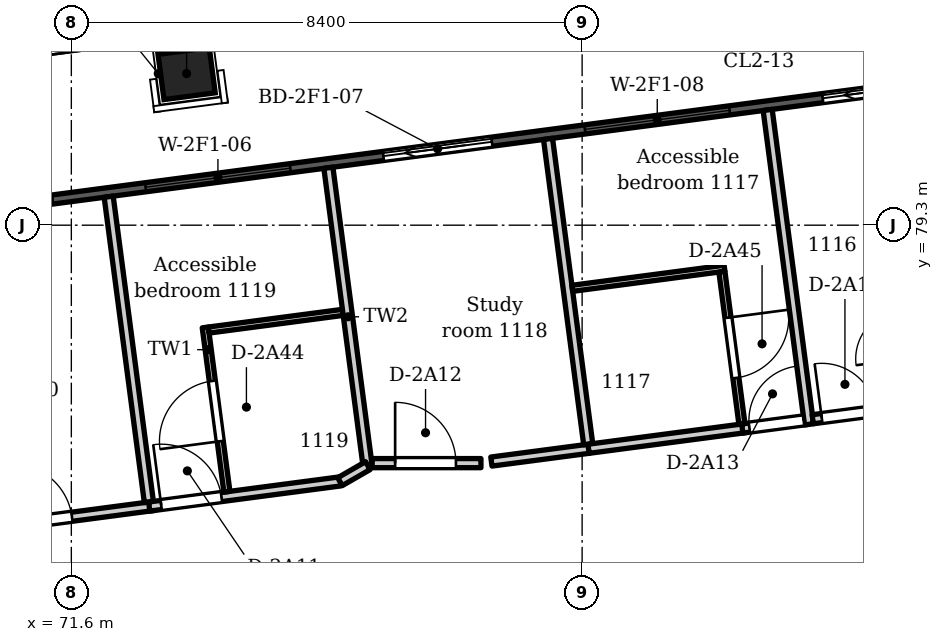
"""IFC4 building model, lengths in metres.
Left out: names, types, materials, properties, quantities, classifications, styles, units other than length and angle.
Written with IfcOpenShell. Run it as: python <this file> out.ifc"""

import sys

from ifc_helpers import new_model, si_unit, direction, frame, frame_2d, origin, origin_2d, place, context, subcontext, project, spatial, polyline, rectangle, outline, extrude, element, fill, save


model = new_model("IFC4")
c1 = context("Model", 3, precision=1e-05, world=origin(), true_north=direction((0.0, 1.0)))
c2 = subcontext(c1, "Body", "Model", "MODEL_VIEW")
j1 = project(units=[si_unit("LENGTHUNIT", "METRE"), si_unit("PLANEANGLEUNIT", "RADIAN")], contexts=[c1])
p1 = place(None, origin())
s1 = spatial("IfcSite", under=j1, at=p1, CompositionType="ELEMENT")
p2 = place(p1, origin())
s2 = spatial("IfcBuilding", under=s1, at=p2, CompositionType="ELEMENT")
p3 = place(p2, frame((0.0, 0.0, 50.4)))
s3 = spatial("IfcBuildingStorey", under=s2, at=p3, CompositionType="ELEMENT", Elevation=50.4)
p4 = place(p3, frame((73.496, 81.793, -0.35), z_axis=(0.0, 0.0, 1.0), x_axis=(0.991444861374, 0.13052619222, 0.0)))
e1 = element("IfcColumn", 1, at=p4, inside=s3, PredefinedType="COLUMN", context=c2, shape_type="SweptSolid", body=[
    extrude(rectangle(XDim=0.85, YDim=0.75, at=origin_2d()), origin(), (0.0, 0.0, 1.0), 3.95),
])
p5 = place(p3, frame((54.142, 77.465, 0.0), z_axis=(0.0, 0.0, 1.0), x_axis=(0.991444696532, 0.130527444308, 0.0)))
e2 = element("IfcWall", 2, at=p5, inside=s3, PredefinedType="SOLIDWALL", context=c2, shape_type="SweptSolid", body=[
    extrude(outline(polyline([(0.149, 0.075), (0.149, -0.075), (47.217, -0.075), (47.217, 0.075), (0.149, 0.075)])), origin(), (0.0, 0.0, 1.0), 3.3),
])
p6 = place(p5, frame((1.222, 0.0, 0.0)))
e3 = element("IfcOpeningElement", 3, at=p6, cuts=e2, PredefinedType="OPENING", context=c2, shape_type="SweptSolid", body=[
    extrude(rectangle(XDim=1.8, YDim=2.6, at=frame_2d((0.9, 1.3))), frame((0.0, 0.085, 0.0), z_axis=(0.0, -1.0, 0.0), x_axis=(1.0, 0.0, 0.0)), (0.0, 0.0, 1.0), 0.17),
])
p7 = place(p5, frame((4.565, 0.0, 0.0)))
e4 = element("IfcOpeningElement", 4, at=p7, cuts=e2, PredefinedType="OPENING", context=c2, shape_type="SweptSolid", body=[
    extrude(rectangle(XDim=1.8, YDim=2.6, at=frame_2d((0.9, 1.3))), frame((0.0, 0.085, 0.0), z_axis=(0.0, -1.0, 0.0), x_axis=(1.0, 0.0, 0.0)), (0.0, 0.0, 1.0), 0.17),
])
p8 = place(p5, frame((8.209, 0.0, 0.0)))
e5 = element("IfcOpeningElement", 5, at=p8, cuts=e2, PredefinedType="OPENING", context=c2, shape_type="SweptSolid", body=[
    extrude(rectangle(XDim=1.8, YDim=2.6, at=frame_2d((0.9, 1.3))), frame((0.0, 0.085, 0.0), z_axis=(0.0, -1.0, 0.0), x_axis=(1.0, 0.0, 0.0)), (0.0, 0.0, 1.0), 0.17),
])
p9 = place(p5, frame((12.453, 0.0, 0.0)))
e6 = element("IfcOpeningElement", 6, at=p9, cuts=e2, PredefinedType="OPENING", context=c2, shape_type="SweptSolid", body=[
    extrude(rectangle(XDim=1.8, YDim=2.6, at=frame_2d((0.9, 1.3))), frame((0.0, 0.085, 0.0), z_axis=(0.0, -1.0, 0.0), x_axis=(1.0, 0.0, 0.0)), (0.0, 0.0, 1.0), 0.17),
])
p10 = place(p5, frame((15.496, 0.0, 0.0)))
e7 = element("IfcOpeningElement", 7, at=p10, cuts=e2, PredefinedType="OPENING", context=c2, shape_type="SweptSolid", body=[
    extrude(rectangle(XDim=1.8, YDim=2.6, at=frame_2d((0.9, 1.3))), frame((0.0, 0.085, 0.0), z_axis=(0.0, -1.0, 0.0), x_axis=(1.0, 0.0, 0.0)), (0.0, 0.0, 1.0), 0.17),
])
p11 = place(p5, frame((18.84, 0.0, 0.15)))
e8 = element("IfcOpeningElement", 8, at=p11, cuts=e2, PredefinedType="OPENING", context=c2, shape_type="SweptSolid", body=[
    extrude(rectangle(XDim=2.4, YDim=2.45, at=frame_2d((1.2, 1.225))), frame((0.0, 0.085, 0.0), z_axis=(0.0, -1.0, 0.0), x_axis=(1.0, 0.0, 0.0)), (0.0, 0.0, 1.0), 0.17),
])
p12 = place(p5, frame((22.783, 0.0, 0.0)))
e9 = element("IfcOpeningElement", 9, at=p12, cuts=e2, PredefinedType="OPENING", context=c2, shape_type="SweptSolid", body=[
    extrude(rectangle(XDim=1.8, YDim=2.6, at=frame_2d((0.9, 1.3))), frame((0.0, 0.085, 0.0), z_axis=(0.0, -1.0, 0.0), x_axis=(1.0, 0.0, 0.0)), (0.0, 0.0, 1.0), 0.17),
])
p13 = place(p5, frame((26.127, 0.0, 0.15)))
e10 = element("IfcOpeningElement", 10, at=p13, cuts=e2, PredefinedType="OPENING", context=c2, shape_type="SweptSolid", body=[
    extrude(rectangle(XDim=2.4, YDim=2.45, at=frame_2d((1.2, 1.225))), frame((0.0, 0.085, 0.0), z_axis=(0.0, -1.0, 0.0), x_axis=(1.0, 0.0, 0.0)), (0.0, 0.0, 1.0), 0.17),
])
p14 = place(p5, frame((30.071, 0.0, 0.0)))
e11 = element("IfcOpeningElement", 11, at=p14, cuts=e2, PredefinedType="OPENING", context=c2, shape_type="SweptSolid", body=[
    extrude(rectangle(XDim=1.8, YDim=2.6, at=frame_2d((0.9, 1.3))), frame((0.0, 0.085, 0.0), z_axis=(0.0, -1.0, 0.0), x_axis=(1.0, 0.0, 0.0)), (0.0, 0.0, 1.0), 0.17),
])
p15 = place(p5, frame((33.114, 0.0, 0.0)))
e12 = element("IfcOpeningElement", 12, at=p15, cuts=e2, PredefinedType="OPENING", context=c2, shape_type="SweptSolid", body=[
    extrude(rectangle(XDim=1.8, YDim=2.6, at=frame_2d((0.9, 1.3))), frame((0.0, 0.085, 0.0), z_axis=(0.0, -1.0, 0.0), x_axis=(1.0, 0.0, 0.0)), (0.0, 0.0, 1.0), 0.17),
])
p16 = place(p5, frame((37.358, 0.0, 0.0)))
e13 = element("IfcOpeningElement", 13, at=p16, cuts=e2, PredefinedType="OPENING", context=c2, shape_type="SweptSolid", body=[
    extrude(rectangle(XDim=1.8, YDim=2.6, at=frame_2d((0.9, 1.3))), frame((0.0, 0.085, 0.0), z_axis=(0.0, -1.0, 0.0), x_axis=(1.0, 0.0, 0.0)), (0.0, 0.0, 1.0), 0.17),
])
p17 = place(p5, frame((41.001, 0.0, 0.0)))
e14 = element("IfcOpeningElement", 14, at=p17, cuts=e2, PredefinedType="OPENING", context=c2, shape_type="SweptSolid", body=[
    extrude(rectangle(XDim=1.8, YDim=2.6, at=frame_2d((0.9, 1.3))), frame((0.0, 0.085, 0.0), z_axis=(0.0, -1.0, 0.0), x_axis=(1.0, 0.0, 0.0)), (0.0, 0.0, 1.0), 0.17),
])
p18 = place(p5, frame((44.345, 0.0, 0.0)))
e15 = element("IfcOpeningElement", 15, at=p18, cuts=e2, PredefinedType="OPENING", context=c2, shape_type="SweptSolid", body=[
    extrude(rectangle(XDim=1.8, YDim=2.6, at=frame_2d((0.9, 1.3))), frame((0.0, 0.085, 0.0), z_axis=(0.0, -1.0, 0.0), x_axis=(1.0, 0.0, 0.0)), (0.0, 0.0, 1.0), 0.17),
])
p19 = place(p3, frame((69.344, 74.207, 0.0), z_axis=(0.0, 0.0, 1.0), x_axis=(0.991427646688, 0.130656884173, 0.0)))
e16 = element("IfcWall", 16, at=p19, inside=s3, PredefinedType="PARTITIONING", context=c2, shape_type="SweptSolid", body=[
    extrude(rectangle(XDim=3.651, YDim=0.15, at=frame_2d((1.826, 0.0))), origin(), (0.0, 0.0, 1.0), 3.3),
])
p20 = place(p19, frame((1.286, 0.0, 0.0)))
e17 = element("IfcOpeningElement", 17, at=p20, cuts=e16, PredefinedType="OPENING", context=c2, shape_type="SweptSolid", body=[
    extrude(rectangle(XDim=1.0, YDim=2.1, at=frame_2d((0.5, 1.05))), frame((0.0, 0.085, 0.0), z_axis=(0.0, -1.0, 0.0), x_axis=(1.0, 0.0, 0.0)), (0.0, 0.0, 1.0), 0.17),
])
p21 = place(p3, frame((72.214, 79.768, 0.0), z_axis=(0.0, 0.0, 1.0), x_axis=(0.130546792746, -0.991442149045, 0.0)))
e18 = element("IfcWall", 18, at=p21, inside=s3, PredefinedType="PARTITIONING", context=c2, shape_type="SweptSolid", body=[
    extrude(rectangle(XDim=5.064, YDim=0.15, at=frame_2d((2.532, 0.0))), origin(), (0.0, 0.0, 1.0), 3.3),
])
p22 = place(p3, frame((72.881, 74.673, 0.0), z_axis=(0.0, 0.0, 1.0), x_axis=(0.991447742753, 0.130504304105, 0.0)))
e19 = element("IfcWall", 19, at=p22, inside=s3, PredefinedType="PARTITIONING", context=c2, shape_type="SweptSolid", body=[
    extrude(rectangle(XDim=3.171, YDim=0.15, at=frame_2d((1.585, 0.0))), origin(), (0.0, 0.0, 1.0), 3.3),
])
p23 = place(p22, frame((0.198, 0.0, 0.0)))
e20 = element("IfcOpeningElement", 20, at=p23, cuts=e19, PredefinedType="OPENING", context=c2, shape_type="SweptSolid", body=[
    extrude(rectangle(XDim=1.0, YDim=2.1, at=frame_2d((0.5, 1.05))), frame((0.0, 0.085, 0.0), z_axis=(0.0, -1.0, 0.0), x_axis=(1.0, 0.0, 0.0)), (0.0, 0.0, 1.0), 0.17),
])
p24 = place(p3, frame((73.802, 77.619, 0.0), z_axis=(0.0, 0.0, 1.0), x_axis=(0.130514759302, -0.991446366479, 0.0)))
e21 = element("IfcWall", 21, at=p24, inside=s3, PredefinedType="PARTITIONING", context=c2, shape_type="SweptSolid", body=[
    extrude(rectangle(XDim=2.725, YDim=0.1, at=frame_2d((1.363, 0.0))), origin(), (0.0, 0.0, 1.0), 3.3),
])
p25 = place(p24, frame((0.888, 0.0, 0.0)))
e22 = element("IfcOpeningElement", 22, at=p25, cuts=e21, PredefinedType="OPENING", context=c2, shape_type="SweptSolid", body=[
    extrude(rectangle(XDim=1.0, YDim=2.1, at=frame_2d((0.5, 1.05))), frame((0.0, 0.06, 0.0), z_axis=(0.0, -1.0, 0.0), x_axis=(1.0, 0.0, 0.0)), (0.0, 0.0, 1.0), 0.12),
])
p26 = place(p3, frame((73.859, 77.575, 0.0), z_axis=(0.0, 0.0, 1.0), x_axis=(0.991425141763, 0.130675890199, 0.0)))
e23 = element("IfcWall", 23, at=p26, inside=s3, PredefinedType="PARTITIONING", context=c2, shape_type="SweptSolid", body=[
    extrude(rectangle(XDim=2.225, YDim=0.1, at=frame_2d((1.113, 0.0))), origin(), (0.0, 0.0, 1.0), 3.3),
])
p27 = place(p3, frame((75.827, 80.244, 0.0), z_axis=(0.0, 0.0, 1.0), x_axis=(0.130426407647, -0.991457993154, 0.0)))
e24 = element("IfcWall", 24, at=p27, inside=s3, PredefinedType="PARTITIONING", context=c2, shape_type="SweptSolid", body=[
    extrude(rectangle(XDim=4.944, YDim=0.15, at=frame_2d((2.472, 0.0))), origin(), (0.0, 0.0, 1.0), 3.3),
])
p28 = place(p3, frame((76.018, 75.082, 0.0), z_axis=(0.0, 0.0, 1.0), x_axis=(0.866446896963, 0.499269240734, 0.0)))
e25 = element("IfcWall", 25, at=p28, inside=s3, PredefinedType="PARTITIONING", context=c2, shape_type="SweptSolid", body=[
    extrude(rectangle(XDim=0.529, YDim=0.15, at=frame_2d((0.264, 0.0))), origin(), (0.0, 0.0, 1.0), 3.3),
])
p29 = place(p3, frame((76.547, 75.387, 0.0), z_axis=(0.0, 0.0, 1.0), x_axis=(1.0, 0.0, 0.0)))
e26 = element("IfcWall", 26, at=p29, inside=s3, PredefinedType="PARTITIONING", context=c2, shape_type="SweptSolid", body=[
    extrude(rectangle(XDim=1.789, YDim=0.15, at=frame_2d((0.895, 0.0))), origin(), (0.0, 0.0, 1.0), 3.3),
])
p30 = place(p29, frame((0.378, 0.0, 0.0)))
e27 = element("IfcOpeningElement", 27, at=p30, cuts=e26, PredefinedType="OPENING", context=c2, shape_type="SweptSolid", body=[
    extrude(rectangle(XDim=1.0, YDim=2.1, at=frame_2d((0.5, 1.05))), frame((0.0, 0.085, 0.0), z_axis=(0.0, -1.0, 0.0), x_axis=(1.0, 0.0, 0.0)), (0.0, 0.0, 1.0), 0.17),
])
p31 = place(p3, frame((78.508, 75.413, 0.0), z_axis=(0.0, 0.0, 1.0), x_axis=(0.991484025307, 0.13022836696, 0.0)))
e28 = element("IfcWall", 28, at=p31, inside=s3, PredefinedType="PARTITIONING", context=c2, shape_type="SweptSolid", body=[
    extrude(rectangle(XDim=1.62, YDim=0.15, at=frame_2d((0.81, 0.0))), origin(), (0.0, 0.0, 1.0), 3.3),
])
p32 = place(p3, frame((79.439, 80.719, 0.0), z_axis=(0.0, 0.0, 1.0), x_axis=(0.130505643681, -0.991447566424, 0.0)))
e29 = element("IfcWall", 29, at=p32, inside=s3, PredefinedType="PARTITIONING", context=c2, shape_type="SweptSolid", body=[
    extrude(rectangle(XDim=5.064, YDim=0.15, at=frame_2d((2.532, 0.0))), origin(), (0.0, 0.0, 1.0), 3.3),
])
p33 = place(p3, frame((79.838, 78.262, 0.0), z_axis=(0.0, 0.0, 1.0), x_axis=(0.991430252683, 0.130637108298, 0.0)))
e30 = element("IfcWall", 30, at=p33, inside=s3, PredefinedType="PARTITIONING", context=c2, shape_type="SweptSolid", body=[
    extrude(rectangle(XDim=2.525, YDim=0.1, at=frame_2d((1.262, 0.0))), origin(), (0.0, 0.0, 1.0), 3.3),
])
p34 = place(p3, frame((80.106, 75.623, 0.0), z_axis=(0.0, 0.0, 1.0), x_axis=(0.991448878041, 0.130495678972, 0.0)))
e31 = element("IfcWall", 31, at=p34, inside=s3, PredefinedType="PARTITIONING", context=c2, shape_type="SweptSolid", body=[
    extrude(rectangle(XDim=2.608, YDim=0.15, at=frame_2d((1.304, 0.0))), origin(), (0.0, 0.0, 1.0), 3.3),
])
p35 = place(p3, frame((82.299, 78.535, 0.0), z_axis=(0.0, 0.0, 1.0), x_axis=(0.130504525485, -0.991447713613, 0.0)))
e32 = element("IfcWall", 32, at=p35, inside=s3, PredefinedType="PARTITIONING", context=c2, shape_type="SweptSolid", body=[
    extrude(rectangle(XDim=2.525, YDim=0.1, at=frame_2d((1.263, 0.0))), origin(), (0.0, 0.0, 1.0), 3.3),
])
p36 = place(p35, frame((0.763, 0.0, 0.0)))
e33 = element("IfcOpeningElement", 33, at=p36, cuts=e32, PredefinedType="OPENING", context=c2, shape_type="SweptSolid", body=[
    extrude(rectangle(XDim=1.0, YDim=2.1, at=frame_2d((0.5, 1.05))), frame((0.0, 0.06, 0.0), z_axis=(0.0, -1.0, 0.0), x_axis=(1.0, 0.0, 0.0)), (0.0, 0.0, 1.0), 0.12),
])
p37 = place(p3, frame((82.634, 75.956, 0.0), z_axis=(0.0, 0.0, 1.0), x_axis=(0.99141275319, 0.130769846721, 0.0)))
e34 = element("IfcWall", 34, at=p37, inside=s3, PredefinedType="PARTITIONING", context=c2, shape_type="SweptSolid", body=[
    extrude(rectangle(XDim=1.102, YDim=0.15, at=frame_2d((0.551, 0.0))), origin(), (0.0, 0.0, 1.0), 3.3),
])
p38 = place(p37, frame((0.117, 0.0, 0.0)))
e35 = element("IfcOpeningElement", 35, at=p38, cuts=e34, PredefinedType="OPENING", context=c2, shape_type="SweptSolid", body=[
    extrude(rectangle(XDim=0.9, YDim=2.1, at=frame_2d((0.45, 1.05))), frame((0.0, 0.085, 0.0), z_axis=(0.0, -1.0, 0.0), x_axis=(1.0, 0.0, 0.0)), (0.0, 0.0, 1.0), 0.17),
])
p39 = place(p3, frame((83.051, 81.195, 0.0), z_axis=(0.0, 0.0, 1.0), x_axis=(0.130492059077, -0.99144935449, 0.0)))
e36 = element("IfcWall", 36, at=p39, inside=s3, PredefinedType="PARTITIONING", context=c2, shape_type="SweptSolid", body=[
    extrude(rectangle(XDim=5.214, YDim=0.15, at=frame_2d((2.607, 0.0))), origin(), (0.0, 0.0, 1.0), 3.3),
])
p40 = place(p3, frame((83.792, 76.109, 0.0), z_axis=(0.0, 0.0, 1.0), x_axis=(0.991466035582, 0.130365257213, 0.0)))
e37 = element("IfcWall", 37, at=p40, inside=s3, PredefinedType="PARTITIONING", context=c2, shape_type="SweptSolid", body=[
    extrude(rectangle(XDim=1.627, YDim=0.15, at=frame_2d((0.814, 0.0))), origin(), (0.0, 0.0, 1.0), 3.3),
])
p41 = place(p40, frame((0.15, 0.0, 0.0)))
e38 = element("IfcOpeningElement", 38, at=p41, cuts=e37, PredefinedType="OPENING", context=c2, shape_type="SweptSolid", body=[
    extrude(rectangle(XDim=0.9, YDim=2.1, at=frame_2d((0.45, 1.05))), frame((0.0, 0.085, 0.0), z_axis=(0.0, -1.0, 0.0), x_axis=(1.0, 0.0, 0.0)), (0.0, 0.0, 1.0), 0.17),
])
p42 = place(p10, origin())
e39 = element("IfcDoor", 39, at=p42, inside=s3, OperationType="SLIDING_TO_LEFT", PredefinedType="DOOR", context=c2, shape_type="SweptSolid", body=[
    extrude(rectangle(XDim=1.8, YDim=2.6, at=frame_2d((0.9, 1.3))), frame((0.0, 0.025, 0.0), z_axis=(0.0, -1.0, 0.0), x_axis=(1.0, 0.0, 0.0)), (0.0, 0.0, 1.0), 0.05),
])
fill(e7, e39)
p43 = place(p11, origin())
e40 = element("IfcWindow", 40, at=p43, inside=s3, PartitioningType="SINGLE_PANEL", PredefinedType="WINDOW", context=c2, shape_type="SweptSolid", body=[
    extrude(rectangle(XDim=2.4, YDim=2.45, at=frame_2d((1.2, 1.225))), frame((0.0, 0.03, 0.0), z_axis=(0.0, -1.0, 0.0), x_axis=(1.0, 0.0, 0.0)), (0.0, 0.0, 1.0), 0.06),
])
fill(e8, e40)
p44 = place(p12, origin())
e41 = element("IfcDoor", 41, at=p44, inside=s3, OperationType="SLIDING_TO_LEFT", PredefinedType="DOOR", context=c2, shape_type="SweptSolid", body=[
    extrude(rectangle(XDim=1.8, YDim=2.6, at=frame_2d((0.9, 1.3))), frame((0.0, 0.025, 0.0), z_axis=(0.0, -1.0, 0.0), x_axis=(1.0, 0.0, 0.0)), (0.0, 0.0, 1.0), 0.05),
])
fill(e9, e41)
p45 = place(p13, origin())
e42 = element("IfcWindow", 42, at=p45, inside=s3, PartitioningType="SINGLE_PANEL", PredefinedType="WINDOW", context=c2, shape_type="SweptSolid", body=[
    extrude(rectangle(XDim=2.4, YDim=2.45, at=frame_2d((1.2, 1.225))), frame((0.0, 0.03, 0.0), z_axis=(0.0, -1.0, 0.0), x_axis=(1.0, 0.0, 0.0)), (0.0, 0.0, 1.0), 0.06),
])
fill(e10, e42)
p46 = place(p14, origin())
e43 = element("IfcDoor", 43, at=p46, inside=s3, OperationType="SLIDING_TO_LEFT", PredefinedType="DOOR", context=c2, shape_type="SweptSolid", body=[
    extrude(rectangle(XDim=1.8, YDim=2.6, at=frame_2d((0.9, 1.3))), frame((0.0, 0.025, 0.0), z_axis=(0.0, -1.0, 0.0), x_axis=(1.0, 0.0, 0.0)), (0.0, 0.0, 1.0), 0.05),
])
fill(e11, e43)
p47 = place(p20, origin())
e44 = element("IfcDoor", 44, at=p47, inside=s3, OperationType="SINGLE_SWING_LEFT", PredefinedType="DOOR", context=c2, shape_type="SweptSolid", body=[
    extrude(rectangle(XDim=1.0, YDim=2.1, at=frame_2d((0.5, 1.05))), frame((0.0, 0.025, 0.0), z_axis=(0.0, -1.0, 0.0), x_axis=(1.0, 0.0, 0.0)), (0.0, 0.0, 1.0), 0.05),
])
fill(e17, e44)
p48 = place(p23, origin())
e45 = element("IfcDoor", 45, at=p48, inside=s3, OperationType="SINGLE_SWING_LEFT", PredefinedType="DOOR", context=c2, shape_type="SweptSolid", body=[
    extrude(rectangle(XDim=1.0, YDim=2.1, at=frame_2d((0.5, 1.05))), frame((0.0, 0.025, 0.0), z_axis=(0.0, -1.0, 0.0), x_axis=(1.0, 0.0, 0.0)), (0.0, 0.0, 1.0), 0.05),
])
fill(e20, e45)
p49 = place(p30, origin())
e46 = element("IfcDoor", 46, at=p49, inside=s3, OperationType="SINGLE_SWING_LEFT", PredefinedType="DOOR", context=c2, shape_type="SweptSolid", body=[
    extrude(rectangle(XDim=1.0, YDim=2.1, at=frame_2d((0.5, 1.05))), frame((0.0, 0.025, 0.0), z_axis=(0.0, -1.0, 0.0), x_axis=(1.0, 0.0, 0.0)), (0.0, 0.0, 1.0), 0.05),
])
fill(e27, e46)
p50 = place(p38, origin())
e47 = element("IfcDoor", 47, at=p50, inside=s3, OperationType="SINGLE_SWING_RIGHT", PredefinedType="DOOR", context=c2, shape_type="SweptSolid", body=[
    extrude(rectangle(XDim=0.9, YDim=2.1, at=frame_2d((0.45, 1.05))), frame((0.0, 0.025, 0.0), z_axis=(0.0, -1.0, 0.0), x_axis=(1.0, 0.0, 0.0)), (0.0, 0.0, 1.0), 0.05),
])
fill(e35, e47)
p51 = place(p41, origin())
e48 = element("IfcDoor", 48, at=p51, inside=s3, OperationType="SINGLE_SWING_LEFT", PredefinedType="DOOR", context=c2, shape_type="SweptSolid", body=[
    extrude(rectangle(XDim=0.9, YDim=2.1, at=frame_2d((0.45, 1.05))), frame((0.0, 0.025, 0.0), z_axis=(0.0, -1.0, 0.0), x_axis=(1.0, 0.0, 0.0)), (0.0, 0.0, 1.0), 0.05),
])
fill(e38, e48)
p52 = place(p25, frame((1.0, 0.0, 0.0), z_axis=(0.0, 0.0, 1.0), x_axis=(-1.0, 0.0, 0.0)))
e49 = element("IfcDoor", 49, at=p52, inside=s3, OperationType="SINGLE_SWING_LEFT", PredefinedType="DOOR", context=c2, shape_type="SweptSolid", body=[
    extrude(rectangle(XDim=1.0, YDim=2.1, at=frame_2d((0.5, 1.05))), frame((0.0, 0.025, 0.0), z_axis=(0.0, -1.0, 0.0), x_axis=(1.0, 0.0, 0.0)), (0.0, 0.0, 1.0), 0.05),
])
fill(e22, e49)
p53 = place(p36, origin())
e50 = element("IfcDoor", 50, at=p53, inside=s3, OperationType="SINGLE_SWING_LEFT", PredefinedType="DOOR", context=c2, shape_type="SweptSolid", body=[
    extrude(rectangle(XDim=1.0, YDim=2.1, at=frame_2d((0.5, 1.05))), frame((0.0, 0.025, 0.0), z_axis=(0.0, -1.0, 0.0), x_axis=(1.0, 0.0, 0.0)), (0.0, 0.0, 1.0), 0.05),
])
fill(e33, e50)
save(model, sys.argv[1])
